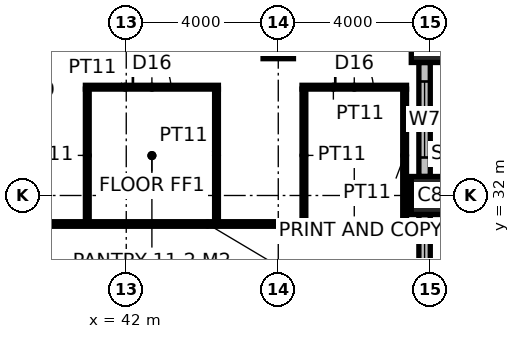
"""IFC4 building model, lengths in metres.
Left out: names, types, materials, properties, quantities, classifications, styles, units other than length and angle.
Written with IfcOpenShell. Run it as: python <this file> out.ifc"""

import sys

from ifc_helpers import new_model, si_unit, direction, frame, frame_2d, origin, origin_2d, place, context, subcontext, project, spatial, rectangle, hollow_rectangle, extrude, element, fill, save


model = new_model("IFC4")
c1 = context("Model", 3, precision=1e-05, world=origin(), true_north=direction((0.0, 1.0)))
c2 = subcontext(c1, "Body", "Model", "MODEL_VIEW")
j1 = project(units=[si_unit("LENGTHUNIT", "METRE"), si_unit("PLANEANGLEUNIT", "RADIAN")], contexts=[c1])
p1 = place(None, origin())
s1 = spatial("IfcSite", under=j1, at=p1, CompositionType="ELEMENT")
p2 = place(p1, origin())
s2 = spatial("IfcBuilding", under=s1, at=p2, CompositionType="ELEMENT")
p3 = place(p2, frame((0.0, 0.0, 234.2)))
s3 = spatial("IfcBuildingStorey", under=s2, at=p3, CompositionType="ELEMENT", Elevation=234.2)
for number, where, z_axis, x_axis in (
    (1, (50.0, 32.0, 0.0), (0.0, 0.0, 1.0), (1.0, 0.0, 0.0)),
    (2, (50.0, 36.0, 0.0), (0.0, 0.0, 1.0), (1.0, 0.0, 0.0)),
):
    element("IfcColumn", number, at=place(p3, frame(where, z_axis=z_axis, x_axis=x_axis)), inside=s3, PredefinedType="COLUMN", context=c2, shape_type="SweptSolid", body=[
        extrude(hollow_rectangle(XDim=1.0, YDim=1.0, WallThickness=0.125, at=origin_2d()), origin(), (0.0, 0.0, 1.0), 4.0),
    ])
p4 = place(p3, frame((46.0, 36.0, 0.0), z_axis=(0.0, 0.0, 1.0), x_axis=(1.0, 0.0, 0.0)))
e3 = element("IfcColumn", 3, at=p4, inside=s3, PredefinedType="COLUMN", context=c2, shape_type="SweptSolid", body=[
    extrude(hollow_rectangle(XDim=0.8, YDim=0.8, WallThickness=0.1, at=origin_2d()), origin(), (0.0, 0.0, 1.0), 4.0),
])
p5 = place(p3, frame((38.575, 31.25, 0.0), z_axis=(0.0, 0.0, 1.0), x_axis=(1.0, 0.0, 0.0)))
e4 = element("IfcWall", 4, at=p5, inside=s3, PredefinedType="PARTITIONING", context=c2, shape_type="SweptSolid", body=[
    extrude(rectangle(XDim=11.125, YDim=0.12, at=frame_2d((5.562, 0.0))), origin(), (0.0, 0.0, 1.0), 3.85),
])
p6 = place(p3, frame((40.925, 34.85, 0.0), z_axis=(0.0, 0.0, 1.0), x_axis=(1.0, 0.0, 0.0)))
e5 = element("IfcWall", 5, at=p6, inside=s3, PredefinedType="PARTITIONING", context=c2, shape_type="SweptSolid", body=[
    extrude(rectangle(XDim=3.5, YDim=0.1, at=frame_2d((1.75, 0.0))), origin(), (0.0, 0.0, 1.0), 3.85),
])
p7 = place(p6, frame((1.25, 0.0, 0.0)))
e6 = element("IfcOpeningElement", 6, at=p7, cuts=e5, PredefinedType="OPENING", context=c2, shape_type="SweptSolid", body=[
    extrude(rectangle(XDim=1.0, YDim=2.2, at=frame_2d((0.5, 1.1))), frame((0.0, 0.06, 0.0), z_axis=(0.0, -1.0, 0.0), x_axis=(1.0, 0.0, 0.0)), (0.0, 0.0, 1.0), 0.12),
])
p8 = place(p3, frame((46.625, 34.85, 0.0), z_axis=(0.0, 0.0, 1.0), x_axis=(1.0, 0.0, 0.0)))
e7 = element("IfcWall", 7, at=p8, inside=s3, PredefinedType="PARTITIONING", context=c2, shape_type="SweptSolid", body=[
    extrude(rectangle(XDim=2.75, YDim=0.1, at=frame_2d((1.375, 0.0))), origin(), (0.0, 0.0, 1.0), 3.85),
])
p9 = place(p8, frame((0.875, 0.0, 0.0)))
e8 = element("IfcOpeningElement", 8, at=p9, cuts=e7, PredefinedType="OPENING", context=c2, shape_type="SweptSolid", body=[
    extrude(rectangle(XDim=1.0, YDim=2.2, at=frame_2d((0.5, 1.1))), frame((0.0, 0.06, 0.0), z_axis=(0.0, -1.0, 0.0), x_axis=(1.0, 0.0, 0.0)), (0.0, 0.0, 1.0), 0.12),
])
for number, where, z_axis, x_axis in (
    (9, (40.975, 31.31, 0.0), (0.0, 0.0, 1.0), (0.0, 1.0, 0.0)),
    (10, (44.375, 31.31, 0.0), (0.0, 0.0, 1.0), (0.0, 1.0, 0.0)),
    (11, (46.675, 31.31, 0.0), (0.0, 0.0, 1.0), (0.0, 1.0, 0.0)),
    (12, (49.325, 31.31, 0.0), (0.0, 0.0, 1.0), (0.0, 1.0, 0.0)),
):
    element("IfcWall", number, at=place(p3, frame(where, z_axis=z_axis, x_axis=x_axis)), inside=s3, PredefinedType="PARTITIONING", context=c2, shape_type="SweptSolid", body=[
        extrude(rectangle(XDim=3.49, YDim=0.1, at=frame_2d((1.745, 0.0))), origin(), (0.0, 0.0, 1.0), 3.85),
    ])
p10 = place(p3, frame((49.85, 28.5, 0.0), z_axis=(0.0, 0.0, 1.0), x_axis=(0.0, 1.0, 0.0)))
e13 = element("IfcWall", 13, at=p10, inside=s3, PredefinedType="ELEMENTEDWALL", context=c2, shape_type="SweptSolid", body=[
    extrude(rectangle(XDim=3.0, YDim=0.3, at=frame_2d((1.5, 0.0))), origin(), (0.0, 0.0, 1.0), 2.95),
])
p11 = place(p10, frame((0.5, 0.0, 0.8)))
e14 = element("IfcOpeningElement", 14, at=p11, cuts=e13, PredefinedType="OPENING", context=c2, shape_type="SweptSolid", body=[
    extrude(rectangle(XDim=2.0, YDim=1.8, at=frame_2d((1.0, 0.9))), frame((0.0, 0.16, 0.0), z_axis=(0.0, -1.0, 0.0), x_axis=(1.0, 0.0, 0.0)), (0.0, 0.0, 1.0), 0.32),
])
p12 = place(p3, frame((49.85, 32.5, 0.0), z_axis=(0.0, 0.0, 1.0), x_axis=(0.0, 1.0, 0.0)))
e15 = element("IfcWall", 15, at=p12, inside=s3, PredefinedType="ELEMENTEDWALL", context=c2, shape_type="SweptSolid", body=[
    extrude(rectangle(XDim=3.0, YDim=0.3, at=frame_2d((1.5, 0.0))), origin(), (0.0, 0.0, 1.0), 2.95),
])
p13 = place(p12, frame((0.5, 0.0, 0.8)))
e16 = element("IfcOpeningElement", 16, at=p13, cuts=e15, PredefinedType="OPENING", context=c2, shape_type="SweptSolid", body=[
    extrude(rectangle(XDim=2.0, YDim=1.8, at=frame_2d((1.0, 0.9))), frame((0.0, 0.16, 0.0), z_axis=(0.0, -1.0, 0.0), x_axis=(1.0, 0.0, 0.0)), (0.0, 0.0, 1.0), 0.32),
])
p14 = place(p7, origin())
e17 = element("IfcDoor", 17, at=p14, inside=s3, OperationType="SINGLE_SWING_LEFT", PredefinedType="DOOR", context=c2, shape_type="SweptSolid", body=[
    extrude(rectangle(XDim=1.0, YDim=2.2, at=frame_2d((0.5, 1.1))), frame((0.0, 0.025, 0.0), z_axis=(0.0, -1.0, 0.0), x_axis=(1.0, 0.0, 0.0)), (0.0, 0.0, 1.0), 0.05),
])
fill(e6, e17)
p15 = place(p9, origin())
e18 = element("IfcDoor", 18, at=p15, inside=s3, OperationType="SINGLE_SWING_LEFT", PredefinedType="DOOR", context=c2, shape_type="SweptSolid", body=[
    extrude(rectangle(XDim=1.0, YDim=2.2, at=frame_2d((0.5, 1.1))), frame((0.0, 0.025, 0.0), z_axis=(0.0, -1.0, 0.0), x_axis=(1.0, 0.0, 0.0)), (0.0, 0.0, 1.0), 0.05),
])
fill(e8, e18)
p16 = place(p11, origin())
e19 = element("IfcWindow", 19, at=p16, inside=s3, PartitioningType="SINGLE_PANEL", PredefinedType="WINDOW", context=c2, shape_type="SweptSolid", body=[
    extrude(rectangle(XDim=2.0, YDim=1.8, at=frame_2d((1.0, 0.9))), frame((0.0, 0.03, 0.0), z_axis=(0.0, -1.0, 0.0), x_axis=(1.0, 0.0, 0.0)), (0.0, 0.0, 1.0), 0.06),
])
fill(e14, e19)
p17 = place(p13, origin())
e20 = element("IfcWindow", 20, at=p17, inside=s3, PartitioningType="SINGLE_PANEL", PredefinedType="WINDOW", context=c2, shape_type="SweptSolid", body=[
    extrude(rectangle(XDim=2.0, YDim=1.8, at=frame_2d((1.0, 0.9))), frame((0.0, 0.03, 0.0), z_axis=(0.0, -1.0, 0.0), x_axis=(1.0, 0.0, 0.0)), (0.0, 0.0, 1.0), 0.06),
])
fill(e16, e20)
save(model, sys.argv[1])
